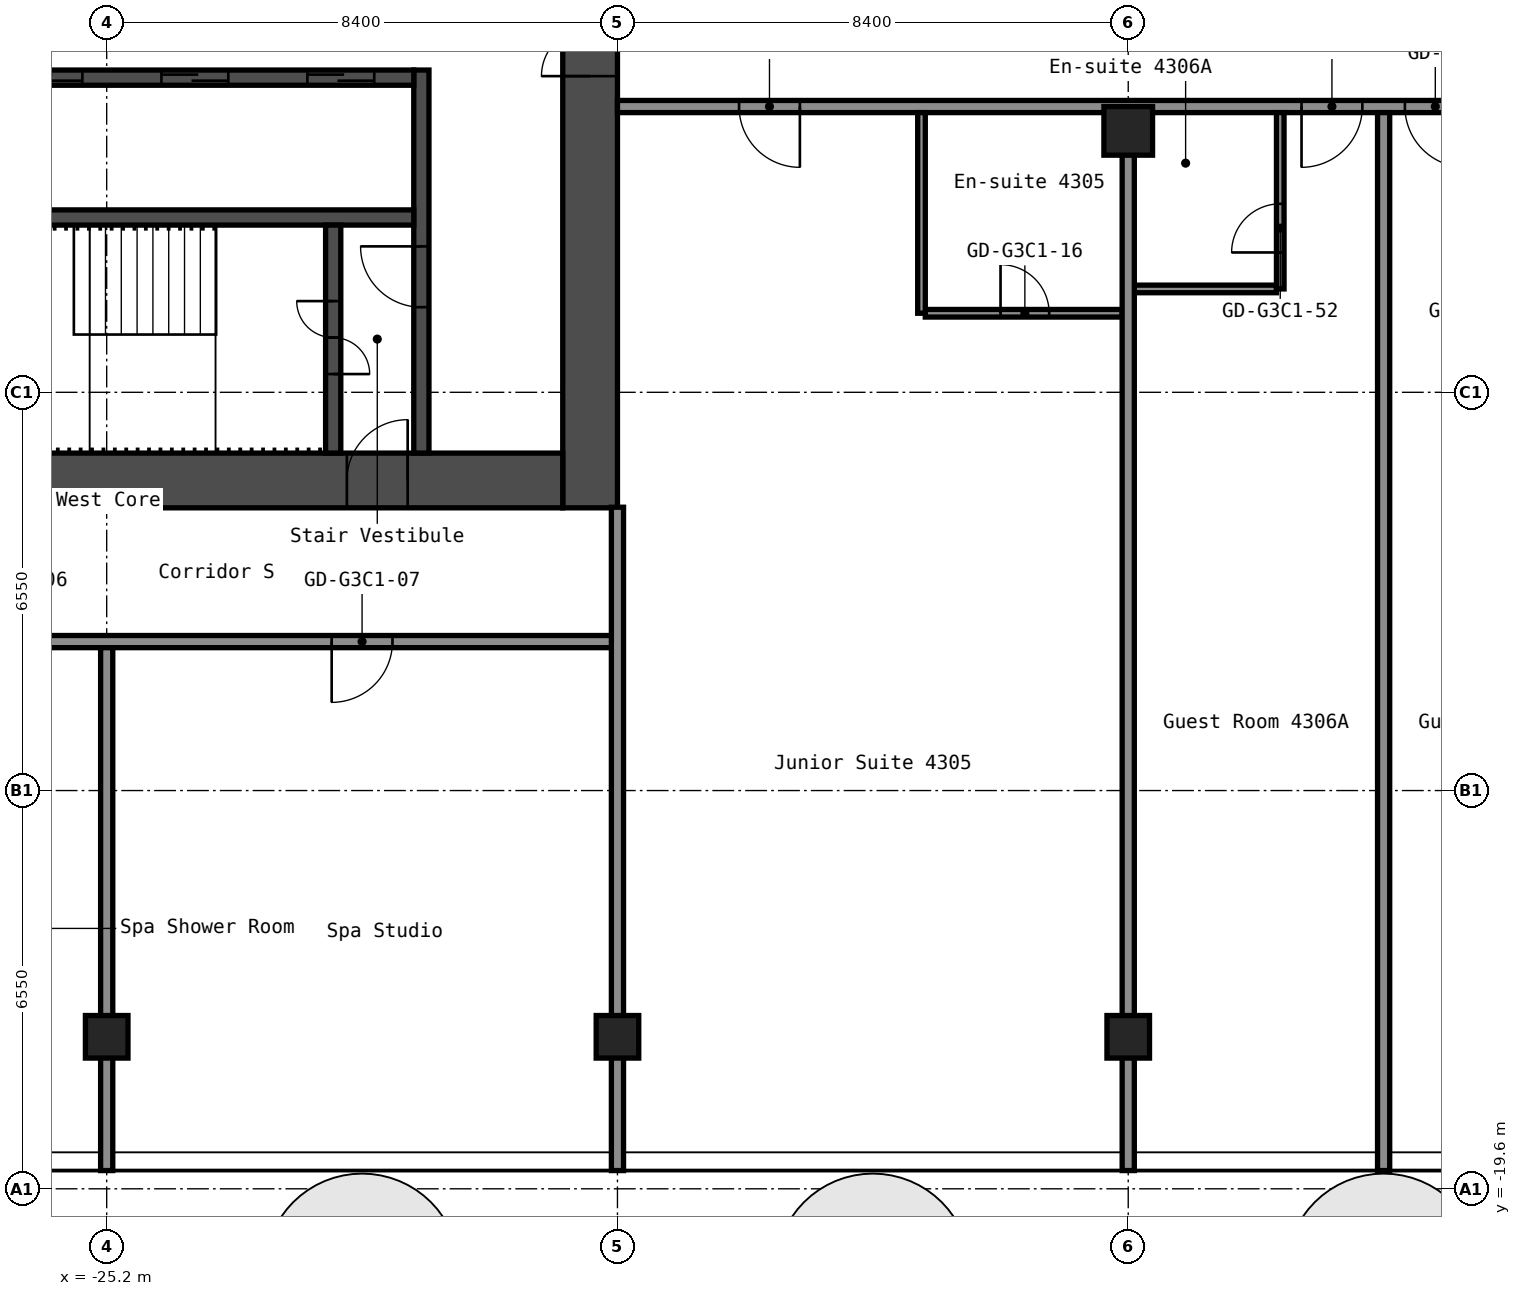
"""IFC4 building model, lengths in metres.
Left out: names, types, materials, properties, quantities, classifications, styles, units other than length and angle.
Written with IfcOpenShell. Run it as: python <this file> out.ifc"""

import sys

from ifc_helpers import new_model, si_unit, direction, frame, frame_2d, origin, origin_2d, place, context, subcontext, project, spatial, rectangle, hollow_rectangle, extrude, element, fill, save


model = new_model("IFC4")
c1 = context("Model", 3, precision=1e-05, world=origin(), true_north=direction((0.0, 1.0)))
c2 = subcontext(c1, "Body", "Model", "MODEL_VIEW")
j1 = project(units=[si_unit("LENGTHUNIT", "METRE"), si_unit("PLANEANGLEUNIT", "RADIAN")], contexts=[c1])
p1 = place(None, origin())
s1 = spatial("IfcSite", under=j1, at=p1, CompositionType="ELEMENT")
p2 = place(p1, origin())
s2 = spatial("IfcBuilding", under=s1, at=p2, CompositionType="ELEMENT")
p3 = place(p2, frame((0.0, 0.0, 153.4)))
s3 = spatial("IfcBuildingStorey", under=s2, at=p3, CompositionType="ELEMENT", Elevation=153.4)
for number, where, z_axis, x_axis in (
    (1, (-25.2, -17.1, 0.0), (0.0, 0.0, 1.0), (1.0, 0.0, 0.0)),
    (2, (-16.8, -17.1, 0.0), (0.0, 0.0, 1.0), (1.0, 0.0, 0.0)),
    (3, (-8.4, -17.1, 0.0), (0.0, 0.0, 1.0), (1.0, 0.0, 0.0)),
):
    element("IfcColumn", number, at=place(p3, frame(where, z_axis=z_axis, x_axis=x_axis)), inside=s3, PredefinedType="COLUMN", context=c2, shape_type="SweptSolid", body=[
        extrude(hollow_rectangle(XDim=0.7, YDim=0.7, WallThickness=0.028, at=origin_2d()), origin(), (0.0, 0.0, 1.0), 2.75),
    ])
p4 = place(p3, frame((-8.4, -2.2, 0.0), z_axis=(0.0, 0.0, 1.0), x_axis=(1.0, 0.0, 0.0)))
e4 = element("IfcColumn", 4, at=p4, inside=s3, PredefinedType="COLUMN", context=c2, shape_type="SweptSolid", body=[
    extrude(hollow_rectangle(XDim=0.8, YDim=0.8, WallThickness=0.032, at=origin_2d()), origin(), (0.0, 0.0, 1.0), 2.75),
])
p5 = place(p3, frame((-17.25, -8.4, 0.0), z_axis=(0.0, 0.0, 1.0), x_axis=(0.0, 1.0, 0.0)))
e5 = element("IfcWall", 5, at=p5, inside=s3, PredefinedType="SHEAR", context=c2, shape_type="SweptSolid", body=[
    extrude(rectangle(XDim=16.8, YDim=0.9, at=frame_2d((8.4, 0.0))), origin(), (0.0, 0.0, 1.0), 2.75),
])
p6 = place(p5, frame((7.1, 0.0, 0.0)))
e6 = element("IfcOpeningElement", 6, at=p6, cuts=e5, PredefinedType="OPENING", context=c2, shape_type="SweptSolid", body=[
    extrude(rectangle(XDim=1.6, YDim=2.1, at=frame_2d((0.8, 1.05))), frame((0.0, 0.46, 0.0), z_axis=(0.0, -1.0, 0.0), x_axis=(1.0, 0.0, 0.0)), (0.0, 0.0, 1.0), 0.92),
])
p7 = place(p3, frame((-32.7, -7.95, 0.0), z_axis=(0.0, 0.0, 1.0), x_axis=(1.0, 0.0, 0.0)))
e7 = element("IfcWall", 7, at=p7, inside=s3, PredefinedType="SHEAR", context=c2, shape_type="SweptSolid", body=[
    extrude(rectangle(XDim=15.0, YDim=0.9, at=frame_2d((7.5, 0.0))), origin(), (0.0, 0.0, 1.0), 2.75),
])
p8 = place(p7, frame((11.45, 0.0, 0.0)))
e8 = element("IfcOpeningElement", 8, at=p8, cuts=e7, PredefinedType="OPENING", context=c2, shape_type="SweptSolid", body=[
    extrude(rectangle(XDim=1.0, YDim=2.1, at=frame_2d((0.5, 1.05))), frame((0.0, 0.46, 0.0), z_axis=(0.0, -1.0, 0.0), x_axis=(1.0, 0.0, 0.0)), (0.0, 0.0, 1.0), 0.92),
])
p9 = place(p3, frame((-20.025, -7.5, 0.0), z_axis=(0.0, 0.0, 1.0), x_axis=(0.0, 1.0, 0.0)))
e9 = element("IfcWall", 9, at=p9, inside=s3, PredefinedType="SHEAR", context=c2, shape_type="SweptSolid", body=[
    extrude(rectangle(XDim=6.3, YDim=0.25, at=frame_2d((3.15, 0.0))), origin(), (0.0, 0.0, 1.0), 2.75),
])
p10 = place(p9, frame((2.4, 0.0, 0.0)))
e10 = element("IfcOpeningElement", 10, at=p10, cuts=e9, PredefinedType="OPENING", context=c2, shape_type="SweptSolid", body=[
    extrude(rectangle(XDim=1.0, YDim=2.1, at=frame_2d((0.5, 1.05))), frame((0.0, 0.135, 0.0), z_axis=(0.0, -1.0, 0.0), x_axis=(1.0, 0.0, 0.0)), (0.0, 0.0, 1.0), 0.27),
])
p11 = place(p3, frame((-27.65, -1.325, 0.0), z_axis=(0.0, 0.0, 1.0), x_axis=(1.0, 0.0, 0.0)))
e11 = element("IfcWall", 11, at=p11, inside=s3, PredefinedType="SHEAR", context=c2, shape_type="SweptSolid", body=[
    extrude(rectangle(XDim=7.5, YDim=0.25, at=frame_2d((3.75, 0.0))), origin(), (0.0, 0.0, 1.0), 2.75),
])
p12 = place(p11, frame((5.75, 0.0, 0.0)))
e12 = element("IfcOpeningElement", 12, at=p12, cuts=e11, PredefinedType="OPENING", context=c2, shape_type="SweptSolid", body=[
    extrude(rectangle(XDim=1.1, YDim=2.1, at=frame_2d((0.55, 1.05))), frame((0.0, 0.135, 0.0), z_axis=(0.0, -1.0, 0.0), x_axis=(1.0, 0.0, 0.0)), (0.0, 0.0, 1.0), 0.27),
])
p13 = place(p11, frame((3.35, 0.0, 0.0)))
e13 = element("IfcOpeningElement", 13, at=p13, cuts=e11, PredefinedType="OPENING", context=c2, shape_type="SweptSolid", body=[
    extrude(rectangle(XDim=1.1, YDim=2.1, at=frame_2d((0.55, 1.05))), frame((0.0, 0.135, 0.0), z_axis=(0.0, -1.0, 0.0), x_axis=(1.0, 0.0, 0.0)), (0.0, 0.0, 1.0), 0.27),
])
p14 = place(p11, frame((0.95, 0.0, 0.0)))
e14 = element("IfcOpeningElement", 14, at=p14, cuts=e11, PredefinedType="OPENING", context=c2, shape_type="SweptSolid", body=[
    extrude(rectangle(XDim=1.1, YDim=2.1, at=frame_2d((0.55, 1.05))), frame((0.0, 0.135, 0.0), z_axis=(0.0, -1.0, 0.0), x_axis=(1.0, 0.0, 0.0)), (0.0, 0.0, 1.0), 0.27),
])
p15 = place(p3, frame((-27.65, -3.625, 0.0), z_axis=(0.0, 0.0, 1.0), x_axis=(1.0, 0.0, 0.0)))
e15 = element("IfcWall", 15, at=p15, inside=s3, PredefinedType="SHEAR", context=c2, shape_type="SweptSolid", body=[
    extrude(rectangle(XDim=7.5, YDim=0.25, at=frame_2d((3.75, 0.0))), origin(), (0.0, 0.0, 1.0), 2.75),
])
p16 = place(p3, frame((-21.475, -7.5, 0.0), z_axis=(0.0, 0.0, 1.0), x_axis=(0.0, 1.0, 0.0)))
e16 = element("IfcWall", 16, at=p16, inside=s3, PredefinedType="SHEAR", context=c2, shape_type="SweptSolid", body=[
    extrude(rectangle(XDim=3.75, YDim=0.25, at=frame_2d((1.875, 0.0))), origin(), (0.0, 0.0, 1.0), 2.75),
])
p17 = place(p16, frame((1.3, 0.0, 0.0)))
e17 = element("IfcOpeningElement", 17, at=p17, cuts=e16, PredefinedType="OPENING", context=c2, shape_type="SweptSolid", body=[
    extrude(rectangle(XDim=1.2, YDim=2.1, at=frame_2d((0.6, 1.05))), frame((0.0, 0.135, 0.0), z_axis=(0.0, -1.0, 0.0), x_axis=(1.0, 0.0, 0.0)), (0.0, 0.0, 1.0), 0.27),
])
p18 = place(p3, frame((-42.7, -10.6, 0.0), z_axis=(0.0, 0.0, 1.0), x_axis=(1.0, 0.0, 0.0)))
e18 = element("IfcWall", 18, at=p18, inside=s3, PredefinedType="PARTITIONING", context=c2, shape_type="SweptSolid", body=[
    extrude(rectangle(XDim=25.9, YDim=0.2, at=frame_2d((12.95, 0.0))), origin(), (0.0, 0.0, 1.0), 2.75),
])
p19 = place(p18, frame((2.665, 0.0, 0.0)))
e19 = element("IfcOpeningElement", 19, at=p19, cuts=e18, PredefinedType="OPENING", context=c2, shape_type="SweptSolid", body=[
    extrude(rectangle(XDim=0.9, YDim=2.1, at=frame_2d((0.45, 1.05))), frame((0.0, 0.11, 0.0), z_axis=(0.0, -1.0, 0.0), x_axis=(1.0, 0.0, 0.0)), (0.0, 0.0, 1.0), 0.22),
])
p20 = place(p18, frame((7.065, 0.0, 0.0)))
e20 = element("IfcOpeningElement", 20, at=p20, cuts=e18, PredefinedType="OPENING", context=c2, shape_type="SweptSolid", body=[
    extrude(rectangle(XDim=0.9, YDim=2.1, at=frame_2d((0.45, 1.05))), frame((0.0, 0.11, 0.0), z_axis=(0.0, -1.0, 0.0), x_axis=(1.0, 0.0, 0.0)), (0.0, 0.0, 1.0), 0.22),
])
p21 = place(p18, frame((11.255, 0.0, 0.0)))
e21 = element("IfcOpeningElement", 21, at=p21, cuts=e18, PredefinedType="OPENING", context=c2, shape_type="SweptSolid", body=[
    extrude(rectangle(XDim=0.9, YDim=2.1, at=frame_2d((0.45, 1.05))), frame((0.0, 0.11, 0.0), z_axis=(0.0, -1.0, 0.0), x_axis=(1.0, 0.0, 0.0)), (0.0, 0.0, 1.0), 0.22),
])
p22 = place(p18, frame((15.455, 0.0, 0.0)))
e22 = element("IfcOpeningElement", 22, at=p22, cuts=e18, PredefinedType="OPENING", context=c2, shape_type="SweptSolid", body=[
    extrude(rectangle(XDim=0.9, YDim=2.1, at=frame_2d((0.45, 1.05))), frame((0.0, 0.11, 0.0), z_axis=(0.0, -1.0, 0.0), x_axis=(1.0, 0.0, 0.0)), (0.0, 0.0, 1.0), 0.22),
])
p23 = place(p18, frame((21.2, 0.0, 0.0)))
e23 = element("IfcOpeningElement", 23, at=p23, cuts=e18, PredefinedType="OPENING", context=c2, shape_type="SweptSolid", body=[
    extrude(rectangle(XDim=1.0, YDim=2.1, at=frame_2d((0.5, 1.05))), frame((0.0, 0.11, 0.0), z_axis=(0.0, -1.0, 0.0), x_axis=(1.0, 0.0, 0.0)), (0.0, 0.0, 1.0), 0.22),
])
p24 = place(p3, frame((-11.738, -5.2, 0.0), z_axis=(0.0, 0.0, 1.0), x_axis=(1.0, 0.0, 0.0)))
e24 = element("IfcWall", 24, at=p24, inside=s3, PredefinedType="PARTITIONING", context=c2, shape_type="SweptSolid", body=[
    extrude(rectangle(XDim=3.238, YDim=0.125, at=frame_2d((1.619, 0.0))), origin(), (0.0, 0.0, 1.0), 2.75),
])
p25 = place(p24, frame((1.238, 0.0, 0.0)))
e25 = element("IfcOpeningElement", 25, at=p25, cuts=e24, PredefinedType="OPENING", context=c2, shape_type="SweptSolid", body=[
    extrude(rectangle(XDim=0.8, YDim=2.1, at=frame_2d((0.4, 1.05))), frame((0.0, 0.073, 0.0), z_axis=(0.0, -1.0, 0.0), x_axis=(1.0, 0.0, 0.0)), (0.0, 0.0, 1.0), 0.145),
])
p26 = place(p3, frame((-8.3, -4.8, 0.0), z_axis=(0.0, 0.0, 1.0), x_axis=(1.0, 0.0, 0.0)))
e26 = element("IfcWall", 26, at=p26, inside=s3, PredefinedType="PARTITIONING", context=c2, shape_type="SweptSolid", body=[
    extrude(rectangle(XDim=2.338, YDim=0.125, at=frame_2d((1.169, 0.0))), origin(), (0.0, 0.0, 1.0), 2.75),
])
p27 = place(p3, frame((-16.8, -1.8, 0.0), z_axis=(0.0, 0.0, 1.0), x_axis=(1.0, 0.0, 0.0)))
e27 = element("IfcWall", 27, at=p27, inside=s3, PredefinedType="PARTITIONING", context=c2, shape_type="SweptSolid", body=[
    extrude(rectangle(XDim=33.6, YDim=0.2, at=frame_2d((16.8, 0.0))), origin(), (0.0, 0.0, 1.0), 2.75),
])
p28 = place(p27, frame((2.0, 0.0, 0.0)))
e28 = element("IfcOpeningElement", 28, at=p28, cuts=e27, PredefinedType="OPENING", context=c2, shape_type="SweptSolid", body=[
    extrude(rectangle(XDim=1.0, YDim=2.1, at=frame_2d((0.5, 1.05))), frame((0.0, 0.11, 0.0), z_axis=(0.0, -1.0, 0.0), x_axis=(1.0, 0.0, 0.0)), (0.0, 0.0, 1.0), 0.22),
])
p29 = place(p27, frame((11.25, 0.0, 0.0)))
e29 = element("IfcOpeningElement", 29, at=p29, cuts=e27, PredefinedType="OPENING", context=c2, shape_type="SweptSolid", body=[
    extrude(rectangle(XDim=1.0, YDim=2.1, at=frame_2d((0.5, 1.05))), frame((0.0, 0.11, 0.0), z_axis=(0.0, -1.0, 0.0), x_axis=(1.0, 0.0, 0.0)), (0.0, 0.0, 1.0), 0.22),
])
p30 = place(p27, frame((12.95, 0.0, 0.0)))
e30 = element("IfcOpeningElement", 30, at=p30, cuts=e27, PredefinedType="OPENING", context=c2, shape_type="SweptSolid", body=[
    extrude(rectangle(XDim=1.0, YDim=2.1, at=frame_2d((0.5, 1.05))), frame((0.0, 0.11, 0.0), z_axis=(0.0, -1.0, 0.0), x_axis=(1.0, 0.0, 0.0)), (0.0, 0.0, 1.0), 0.22),
])
p31 = place(p27, frame((18.87, 0.0, 0.0)))
e31 = element("IfcOpeningElement", 31, at=p31, cuts=e27, PredefinedType="OPENING", context=c2, shape_type="SweptSolid", body=[
    extrude(rectangle(XDim=0.9, YDim=2.1, at=frame_2d((0.45, 1.05))), frame((0.0, 0.11, 0.0), z_axis=(0.0, -1.0, 0.0), x_axis=(1.0, 0.0, 0.0)), (0.0, 0.0, 1.0), 0.22),
])
p32 = place(p27, frame((23.07, 0.0, 0.0)))
e32 = element("IfcOpeningElement", 32, at=p32, cuts=e27, PredefinedType="OPENING", context=c2, shape_type="SweptSolid", body=[
    extrude(rectangle(XDim=0.9, YDim=2.1, at=frame_2d((0.45, 1.05))), frame((0.0, 0.11, 0.0), z_axis=(0.0, -1.0, 0.0), x_axis=(1.0, 0.0, 0.0)), (0.0, 0.0, 1.0), 0.22),
])
p33 = place(p27, frame((28.05, 0.0, 0.0)))
e33 = element("IfcOpeningElement", 33, at=p33, cuts=e27, PredefinedType="OPENING", context=c2, shape_type="SweptSolid", body=[
    extrude(rectangle(XDim=1.0, YDim=2.1, at=frame_2d((0.5, 1.05))), frame((0.0, 0.11, 0.0), z_axis=(0.0, -1.0, 0.0), x_axis=(1.0, 0.0, 0.0)), (0.0, 0.0, 1.0), 0.22),
])
p34 = place(p27, frame((29.75, 0.0, 0.0)))
e34 = element("IfcOpeningElement", 34, at=p34, cuts=e27, PredefinedType="OPENING", context=c2, shape_type="SweptSolid", body=[
    extrude(rectangle(XDim=1.0, YDim=2.1, at=frame_2d((0.5, 1.05))), frame((0.0, 0.11, 0.0), z_axis=(0.0, -1.0, 0.0), x_axis=(1.0, 0.0, 0.0)), (0.0, 0.0, 1.0), 0.22),
])
p35 = place(p3, frame((-25.2, -19.3, 0.0), z_axis=(0.0, 0.0, 1.0), x_axis=(0.0, 1.0, 0.0)))
e35 = element("IfcWall", 35, at=p35, inside=s3, PredefinedType="PARTITIONING", context=c2, shape_type="SweptSolid", body=[
    extrude(rectangle(XDim=8.6, YDim=0.2, at=frame_2d((4.3, 0.0))), origin(), (0.0, 0.0, 1.0), 2.75),
])
p36 = place(p3, frame((-16.8, -19.3, 0.0), z_axis=(0.0, 0.0, 1.0), x_axis=(0.0, 1.0, 0.0)))
e36 = element("IfcWall", 36, at=p36, inside=s3, PredefinedType="PARTITIONING", context=c2, shape_type="SweptSolid", body=[
    extrude(rectangle(XDim=10.91, YDim=0.2, at=frame_2d((5.455, 0.0))), origin(), (0.0, 0.0, 1.0), 2.75),
])
p37 = place(p3, frame((-11.8, -5.2, 0.0), z_axis=(0.0, 0.0, 1.0), x_axis=(0.0, 1.0, 0.0)))
e37 = element("IfcWall", 37, at=p37, inside=s3, PredefinedType="PARTITIONING", context=c2, shape_type="SweptSolid", body=[
    extrude(rectangle(XDim=3.3, YDim=0.125, at=frame_2d((1.65, 0.0))), origin(), (0.0, 0.0, 1.0), 2.75),
])
p38 = place(p3, frame((-8.4, -19.3, 0.0), z_axis=(0.0, 0.0, 1.0), x_axis=(0.0, 1.0, 0.0)))
e38 = element("IfcWall", 38, at=p38, inside=s3, PredefinedType="PARTITIONING", context=c2, shape_type="SweptSolid", body=[
    extrude(rectangle(XDim=16.71, YDim=0.2, at=frame_2d((8.355, 0.0))), origin(), (0.0, 0.0, 1.0), 2.75),
])
p39 = place(p3, frame((-5.9, -4.8, 0.0), z_axis=(0.0, 0.0, 1.0), x_axis=(0.0, 1.0, 0.0)))
e39 = element("IfcWall", 39, at=p39, inside=s3, PredefinedType="PARTITIONING", context=c2, shape_type="SweptSolid", body=[
    extrude(rectangle(XDim=2.9, YDim=0.125, at=frame_2d((1.45, 0.0))), origin(), (0.0, 0.0, 1.0), 2.75),
])
p40 = place(p39, frame((0.6, 0.0, 0.0)))
e40 = element("IfcOpeningElement", 40, at=p40, cuts=e39, PredefinedType="OPENING", context=c2, shape_type="SweptSolid", body=[
    extrude(rectangle(XDim=0.8, YDim=2.1, at=frame_2d((0.4, 1.05))), frame((0.0, 0.073, 0.0), z_axis=(0.0, -1.0, 0.0), x_axis=(1.0, 0.0, 0.0)), (0.0, 0.0, 1.0), 0.145),
])
p41 = place(p3, frame((-4.2, -19.3, 0.0), z_axis=(0.0, 0.0, 1.0), x_axis=(0.0, 1.0, 0.0)))
e41 = element("IfcWall", 41, at=p41, inside=s3, PredefinedType="PARTITIONING", context=c2, shape_type="SweptSolid", body=[
    extrude(rectangle(XDim=17.4, YDim=0.2, at=frame_2d((8.7, 0.0))), origin(), (0.0, 0.0, 1.0), 2.75),
])
p42 = place(p6, origin())
e42 = element("IfcDoor", 42, at=p42, inside=s3, OperationType="DOUBLE_DOOR_SINGLE_SWING", PredefinedType="DOOR", context=c2, shape_type="SweptSolid", body=[
    extrude(rectangle(XDim=1.6, YDim=2.1, at=frame_2d((0.8, 1.05))), frame((0.0, 0.025, 0.0), z_axis=(0.0, -1.0, 0.0), x_axis=(1.0, 0.0, 0.0)), (0.0, 0.0, 1.0), 0.05),
])
fill(e6, e42)
p43 = place(p8, origin())
e43 = element("IfcDoor", 43, at=p43, inside=s3, OperationType="SINGLE_SWING_LEFT", PredefinedType="DOOR", context=c2, shape_type="SweptSolid", body=[
    extrude(rectangle(XDim=1.0, YDim=2.1, at=frame_2d((0.5, 1.05))), frame((0.0, 0.025, 0.0), z_axis=(0.0, -1.0, 0.0), x_axis=(1.0, 0.0, 0.0)), (0.0, 0.0, 1.0), 0.05),
])
fill(e8, e43)
p44 = place(p17, origin())
e44 = element("IfcDoor", 44, at=p44, inside=s3, OperationType="DOUBLE_DOOR_SINGLE_SWING", PredefinedType="DOOR", context=c2, shape_type="SweptSolid", body=[
    extrude(rectangle(XDim=1.2, YDim=2.1, at=frame_2d((0.6, 1.05))), frame((0.0, 0.025, 0.0), z_axis=(0.0, -1.0, 0.0), x_axis=(1.0, 0.0, 0.0)), (0.0, 0.0, 1.0), 0.05),
])
fill(e17, e44)
p45 = place(p10, origin())
e45 = element("IfcDoor", 45, at=p45, inside=s3, OperationType="SINGLE_SWING_LEFT", PredefinedType="DOOR", context=c2, shape_type="SweptSolid", body=[
    extrude(rectangle(XDim=1.0, YDim=2.1, at=frame_2d((0.5, 1.05))), frame((0.0, 0.025, 0.0), z_axis=(0.0, -1.0, 0.0), x_axis=(1.0, 0.0, 0.0)), (0.0, 0.0, 1.0), 0.05),
])
fill(e10, e45)
p46 = place(p12, origin())
e46 = element("IfcDoor", 46, at=p46, inside=s3, OperationType="DOUBLE_DOOR_SLIDING", PredefinedType="DOOR", context=c2, shape_type="SweptSolid", body=[
    extrude(rectangle(XDim=1.1, YDim=2.1, at=frame_2d((0.55, 1.05))), frame((0.0, 0.025, 0.0), z_axis=(0.0, -1.0, 0.0), x_axis=(1.0, 0.0, 0.0)), (0.0, 0.0, 1.0), 0.05),
])
fill(e12, e46)
p47 = place(p13, origin())
e47 = element("IfcDoor", 47, at=p47, inside=s3, OperationType="DOUBLE_DOOR_SLIDING", PredefinedType="DOOR", context=c2, shape_type="SweptSolid", body=[
    extrude(rectangle(XDim=1.1, YDim=2.1, at=frame_2d((0.55, 1.05))), frame((0.0, 0.025, 0.0), z_axis=(0.0, -1.0, 0.0), x_axis=(1.0, 0.0, 0.0)), (0.0, 0.0, 1.0), 0.05),
])
fill(e13, e47)
p48 = place(p14, origin())
e48 = element("IfcDoor", 48, at=p48, inside=s3, OperationType="DOUBLE_DOOR_SLIDING", PredefinedType="DOOR", context=c2, shape_type="SweptSolid", body=[
    extrude(rectangle(XDim=1.1, YDim=2.1, at=frame_2d((0.55, 1.05))), frame((0.0, 0.025, 0.0), z_axis=(0.0, -1.0, 0.0), x_axis=(1.0, 0.0, 0.0)), (0.0, 0.0, 1.0), 0.05),
])
fill(e14, e48)
p49 = place(p23, origin())
e49 = element("IfcDoor", 49, at=p49, inside=s3, OperationType="SINGLE_SWING_LEFT", PredefinedType="DOOR", context=c2, shape_type="SweptSolid", body=[
    extrude(rectangle(XDim=1.0, YDim=2.1, at=frame_2d((0.5, 1.05))), frame((0.0, 0.025, 0.0), z_axis=(0.0, -1.0, 0.0), x_axis=(1.0, 0.0, 0.0)), (0.0, 0.0, 1.0), 0.05),
])
fill(e23, e49)
p50 = place(p25, origin())
e50 = element("IfcDoor", 50, at=p50, inside=s3, OperationType="SINGLE_SWING_RIGHT", PredefinedType="DOOR", context=c2, shape_type="SweptSolid", body=[
    extrude(rectangle(XDim=0.8, YDim=2.1, at=frame_2d((0.4, 1.05))), frame((0.0, 0.025, 0.0), z_axis=(0.0, -1.0, 0.0), x_axis=(1.0, 0.0, 0.0)), (0.0, 0.0, 1.0), 0.05),
])
fill(e25, e50)
p51 = place(p28, origin())
e51 = element("IfcDoor", 51, at=p51, inside=s3, OperationType="SINGLE_SWING_RIGHT", PredefinedType="DOOR", context=c2, shape_type="SweptSolid", body=[
    extrude(rectangle(XDim=1.0, YDim=2.1, at=frame_2d((0.5, 1.05))), frame((0.0, 0.025, 0.0), z_axis=(0.0, -1.0, 0.0), x_axis=(1.0, 0.0, 0.0)), (0.0, 0.0, 1.0), 0.05),
])
fill(e28, e51)
p52 = place(p29, origin())
e52 = element("IfcDoor", 52, at=p52, inside=s3, OperationType="SINGLE_SWING_LEFT", PredefinedType="DOOR", context=c2, shape_type="SweptSolid", body=[
    extrude(rectangle(XDim=1.0, YDim=2.1, at=frame_2d((0.5, 1.05))), frame((0.0, 0.025, 0.0), z_axis=(0.0, -1.0, 0.0), x_axis=(1.0, 0.0, 0.0)), (0.0, 0.0, 1.0), 0.05),
])
fill(e29, e52)
p53 = place(p30, origin())
e53 = element("IfcDoor", 53, at=p53, inside=s3, OperationType="SINGLE_SWING_RIGHT", PredefinedType="DOOR", context=c2, shape_type="SweptSolid", body=[
    extrude(rectangle(XDim=1.0, YDim=2.1, at=frame_2d((0.5, 1.05))), frame((0.0, 0.025, 0.0), z_axis=(0.0, -1.0, 0.0), x_axis=(1.0, 0.0, 0.0)), (0.0, 0.0, 1.0), 0.05),
])
fill(e30, e53)
p54 = place(p40, origin())
e54 = element("IfcDoor", 54, at=p54, inside=s3, OperationType="SINGLE_SWING_RIGHT", PredefinedType="DOOR", context=c2, shape_type="SweptSolid", body=[
    extrude(rectangle(XDim=0.8, YDim=2.1, at=frame_2d((0.4, 1.05))), frame((0.0, 0.025, 0.0), z_axis=(0.0, -1.0, 0.0), x_axis=(1.0, 0.0, 0.0)), (0.0, 0.0, 1.0), 0.05),
])
fill(e40, e54)
save(model, sys.argv[1])
